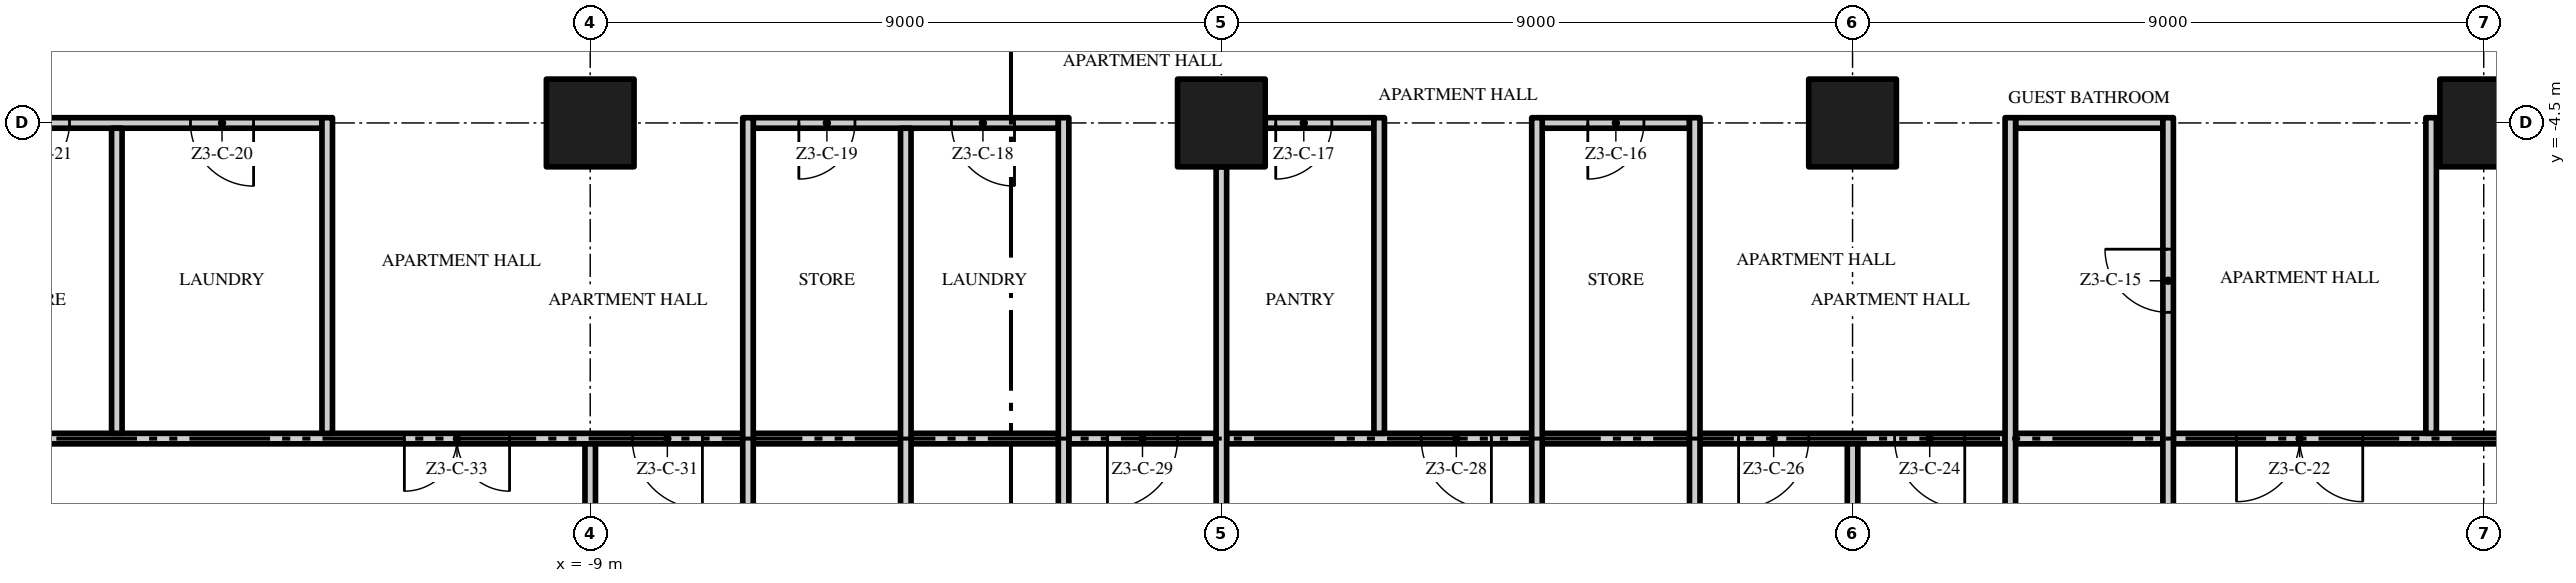
"""IFC4 building model, lengths in metres.
Left out: names, types, materials, properties, quantities, classifications, styles, units other than length and angle.
Written with IfcOpenShell. Run it as: python <this file> out.ifc"""

import sys

from ifc_helpers import new_model, si_unit, direction, frame, frame_2d, origin, origin_2d, place, context, subcontext, project, spatial, rectangle, extrude, element, fill, save


model = new_model("IFC4")
c1 = context("Model", 3, precision=1e-05, world=origin(), true_north=direction((0.0, 1.0)))
c2 = subcontext(c1, "Body", "Model", "MODEL_VIEW")
j1 = project(units=[si_unit("LENGTHUNIT", "METRE"), si_unit("PLANEANGLEUNIT", "RADIAN")], contexts=[c1])
p1 = place(None, origin())
s1 = spatial("IfcSite", under=j1, at=p1, CompositionType="ELEMENT")
p2 = place(p1, origin())
s2 = spatial("IfcBuilding", under=s1, at=p2, CompositionType="ELEMENT")
p3 = place(p2, frame((0.0, 0.0, 155.4)))
s3 = spatial("IfcBuildingStorey", under=s2, at=p3, CompositionType="ELEMENT", Elevation=155.4)
for number, where, z_axis, x_axis in (
    (1, (-9.0, -4.5, 0.0), (0.0, 0.0, 1.0), (1.0, 0.0, 0.0)),
    (2, (0.0, -4.5, 0.0), (0.0, 0.0, 1.0), (1.0, 0.0, 0.0)),
    (3, (18.0, -4.5, 0.0), (0.0, 0.0, 1.0), (1.0, 0.0, 0.0)),
    (4, (9.0, -4.5, 0.0), (0.0, 0.0, 1.0), (1.0, 0.0, 0.0)),
):
    element("IfcColumn", number, at=place(p3, frame(where, z_axis=z_axis, x_axis=x_axis)), inside=s3, PredefinedType="COLUMN", context=c2, shape_type="SweptSolid", body=[
        extrude(rectangle(XDim=1.25, YDim=1.25, at=origin_2d()), origin(), (0.0, 0.0, 1.0), 3.5),
    ])
p4 = place(p3, frame((-6.825, -9.0, 0.0), z_axis=(0.0, 0.0, 1.0), x_axis=(-1.0, 0.0, 0.0)))
e5 = element("IfcWall", 5, at=p4, inside=s3, PredefinedType="PARTITIONING", context=c2, shape_type="SweptSolid", body=[
    extrude(rectangle(XDim=11.1, YDim=0.15, at=frame_2d((5.55, 0.0))), origin(), (0.0, 0.0, 1.0), 3.5),
])
p5 = place(p4, frame((0.575, 0.0, 0.0)))
e6 = element("IfcOpeningElement", 6, at=p5, cuts=e5, PredefinedType="OPENING", context=c2, shape_type="SweptSolid", body=[
    extrude(rectangle(XDim=1.0, YDim=2.4, at=frame_2d((0.5, 1.2))), frame((0.0, 0.085, 0.0), z_axis=(0.0, -1.0, 0.0), x_axis=(1.0, 0.0, 0.0)), (0.0, 0.0, 1.0), 0.17),
])
p6 = place(p4, frame((3.325, 0.0, 0.0)))
e7 = element("IfcOpeningElement", 7, at=p6, cuts=e5, PredefinedType="OPENING", context=c2, shape_type="SweptSolid", body=[
    extrude(rectangle(XDim=1.5, YDim=2.4, at=frame_2d((0.75, 1.2))), frame((0.0, 0.085, 0.0), z_axis=(0.0, -1.0, 0.0), x_axis=(1.0, 0.0, 0.0)), (0.0, 0.0, 1.0), 0.17),
])
for number, where, z_axis, x_axis in (
    (8, (-6.675, -9.0, 0.0), (0.0, 0.0, 1.0), (1.0, 0.0, 0.0)),
    (9, (-4.425, -9.0, 0.0), (0.0, 0.0, 1.0), (1.0, 0.0, 0.0)),
):
    element("IfcWall", number, at=place(p3, frame(where, z_axis=z_axis, x_axis=x_axis)), inside=s3, PredefinedType="PARTITIONING", context=c2, shape_type="SweptSolid", body=[
        extrude(rectangle(XDim=2.1, YDim=0.15, at=frame_2d((1.05, 0.0))), origin(), (0.0, 0.0, 1.0), 3.5),
    ])
p7 = place(p3, frame((-0.075, -9.0, 0.0), z_axis=(0.0, 0.0, 1.0), x_axis=(-1.0, 0.0, 0.0)))
e10 = element("IfcWall", 10, at=p7, inside=s3, PredefinedType="PARTITIONING", context=c2, shape_type="SweptSolid", body=[
    extrude(rectangle(XDim=2.1, YDim=0.15, at=frame_2d((1.05, 0.0))), origin(), (0.0, 0.0, 1.0), 3.5),
])
p8 = place(p7, frame((0.55, 0.0, 0.0)))
e11 = element("IfcOpeningElement", 11, at=p8, cuts=e10, PredefinedType="OPENING", context=c2, shape_type="SweptSolid", body=[
    extrude(rectangle(XDim=1.0, YDim=2.4, at=frame_2d((0.5, 1.2))), frame((0.0, 0.085, 0.0), z_axis=(0.0, -1.0, 0.0), x_axis=(1.0, 0.0, 0.0)), (0.0, 0.0, 1.0), 0.17),
])
p9 = place(p3, frame((4.425, -9.0, 0.0), z_axis=(0.0, 0.0, 1.0), x_axis=(-1.0, 0.0, 0.0)))
e12 = element("IfcWall", 12, at=p9, inside=s3, PredefinedType="PARTITIONING", context=c2, shape_type="SweptSolid", body=[
    extrude(rectangle(XDim=4.35, YDim=0.15, at=frame_2d((2.175, 0.0))), origin(), (0.0, 0.0, 1.0), 3.5),
])
p10 = place(p9, frame((0.575, 0.0, 0.0)))
e13 = element("IfcOpeningElement", 13, at=p10, cuts=e12, PredefinedType="OPENING", context=c2, shape_type="SweptSolid", body=[
    extrude(rectangle(XDim=1.0, YDim=2.4, at=frame_2d((0.5, 1.2))), frame((0.0, 0.085, 0.0), z_axis=(0.0, -1.0, 0.0), x_axis=(1.0, 0.0, 0.0)), (0.0, 0.0, 1.0), 0.17),
])
p11 = place(p3, frame((4.575, -9.0, 0.0), z_axis=(0.0, 0.0, 1.0), x_axis=(1.0, 0.0, 0.0)))
e14 = element("IfcWall", 14, at=p11, inside=s3, PredefinedType="PARTITIONING", context=c2, shape_type="SweptSolid", body=[
    extrude(rectangle(XDim=2.1, YDim=0.15, at=frame_2d((1.05, 0.0))), origin(), (0.0, 0.0, 1.0), 3.5),
])
p12 = place(p3, frame((11.175, -9.0, 0.0), z_axis=(0.0, 0.0, 1.0), x_axis=(-1.0, 0.0, 0.0)))
e15 = element("IfcWall", 15, at=p12, inside=s3, PredefinedType="PARTITIONING", context=c2, shape_type="SweptSolid", body=[
    extrude(rectangle(XDim=4.35, YDim=0.15, at=frame_2d((2.175, 0.0))), origin(), (0.0, 0.0, 1.0), 3.5),
])
p13 = place(p12, frame((0.575, 0.0, 0.0)))
e16 = element("IfcOpeningElement", 16, at=p13, cuts=e15, PredefinedType="OPENING", context=c2, shape_type="SweptSolid", body=[
    extrude(rectangle(XDim=1.0, YDim=2.4, at=frame_2d((0.5, 1.2))), frame((0.0, 0.085, 0.0), z_axis=(0.0, -1.0, 0.0), x_axis=(1.0, 0.0, 0.0)), (0.0, 0.0, 1.0), 0.17),
])
p14 = place(p12, frame((2.8, 0.0, 0.0)))
e17 = element("IfcOpeningElement", 17, at=p14, cuts=e15, PredefinedType="OPENING", context=c2, shape_type="SweptSolid", body=[
    extrude(rectangle(XDim=1.0, YDim=2.4, at=frame_2d((0.5, 1.2))), frame((0.0, 0.085, 0.0), z_axis=(0.0, -1.0, 0.0), x_axis=(1.0, 0.0, 0.0)), (0.0, 0.0, 1.0), 0.17),
])
p15 = place(p3, frame((11.325, -9.0, 0.0), z_axis=(0.0, 0.0, 1.0), x_axis=(1.0, 0.0, 0.0)))
e18 = element("IfcWall", 18, at=p15, inside=s3, PredefinedType="PARTITIONING", context=c2, shape_type="SweptSolid", body=[
    extrude(rectangle(XDim=2.1, YDim=0.15, at=frame_2d((1.05, 0.0))), origin(), (0.0, 0.0, 1.0), 3.5),
])
p16 = place(p3, frame((22.2, -9.0, 0.0), z_axis=(0.0, 0.0, 1.0), x_axis=(-1.0, 0.0, 0.0)))
e19 = element("IfcWall", 19, at=p16, inside=s3, PredefinedType="PARTITIONING", context=c2, shape_type="SweptSolid", body=[
    extrude(rectangle(XDim=8.625, YDim=0.15, at=frame_2d((4.312, 0.0))), origin(), (0.0, 0.0, 1.0), 3.5),
])
p17 = place(p16, frame((5.925, 0.0, 0.0)))
e20 = element("IfcOpeningElement", 20, at=p17, cuts=e19, PredefinedType="OPENING", context=c2, shape_type="SweptSolid", body=[
    extrude(rectangle(XDim=1.8, YDim=2.4, at=frame_2d((0.9, 1.2))), frame((0.0, 0.085, 0.0), z_axis=(0.0, -1.0, 0.0), x_axis=(1.0, 0.0, 0.0)), (0.0, 0.0, 1.0), 0.17),
])
p18 = place(p3, frame((-12.825, -4.5, 0.0), z_axis=(0.0, 0.0, 1.0), x_axis=(-1.0, 0.0, 0.0)))
e21 = element("IfcWall", 21, at=p18, inside=s3, PredefinedType="PARTITIONING", context=c2, shape_type="SweptSolid", body=[
    extrude(rectangle(XDim=4.55, YDim=0.15, at=frame_2d((2.275, 0.0))), origin(), (0.0, 0.0, 1.0), 3.5),
])
p19 = place(p18, frame((0.975, 0.0, 0.0)))
e22 = element("IfcOpeningElement", 22, at=p19, cuts=e21, PredefinedType="OPENING", context=c2, shape_type="SweptSolid", body=[
    extrude(rectangle(XDim=0.9, YDim=2.1, at=frame_2d((0.45, 1.05))), frame((0.0, 0.085, 0.0), z_axis=(0.0, -1.0, 0.0), x_axis=(1.0, 0.0, 0.0)), (0.0, 0.0, 1.0), 0.17),
])
p20 = place(p18, frame((3.6, 0.0, 0.0)))
e23 = element("IfcOpeningElement", 23, at=p20, cuts=e21, PredefinedType="OPENING", context=c2, shape_type="SweptSolid", body=[
    extrude(rectangle(XDim=0.8, YDim=2.0, at=frame_2d((0.4, 1.0))), frame((0.0, 0.085, 0.0), z_axis=(0.0, -1.0, 0.0), x_axis=(1.0, 0.0, 0.0)), (0.0, 0.0, 1.0), 0.17),
])
p21 = place(p3, frame((-2.325, -4.5, 0.0), z_axis=(0.0, 0.0, 1.0), x_axis=(-1.0, 0.0, 0.0)))
e24 = element("IfcWall", 24, at=p21, inside=s3, PredefinedType="PARTITIONING", context=c2, shape_type="SweptSolid", body=[
    extrude(rectangle(XDim=4.35, YDim=0.15, at=frame_2d((2.175, 0.0))), origin(), (0.0, 0.0, 1.0), 3.5),
])
p22 = place(p21, frame((0.625, 0.0, 0.0)))
e25 = element("IfcOpeningElement", 25, at=p22, cuts=e24, PredefinedType="OPENING", context=c2, shape_type="SweptSolid", body=[
    extrude(rectangle(XDim=0.9, YDim=2.1, at=frame_2d((0.45, 1.05))), frame((0.0, 0.085, 0.0), z_axis=(0.0, -1.0, 0.0), x_axis=(1.0, 0.0, 0.0)), (0.0, 0.0, 1.0), 0.17),
])
p23 = place(p21, frame((2.9, 0.0, 0.0)))
e26 = element("IfcOpeningElement", 26, at=p23, cuts=e24, PredefinedType="OPENING", context=c2, shape_type="SweptSolid", body=[
    extrude(rectangle(XDim=0.8, YDim=2.0, at=frame_2d((0.4, 1.0))), frame((0.0, 0.085, 0.0), z_axis=(0.0, -1.0, 0.0), x_axis=(1.0, 0.0, 0.0)), (0.0, 0.0, 1.0), 0.17),
])
p24 = place(p3, frame((2.175, -4.5, 0.0), z_axis=(0.0, 0.0, 1.0), x_axis=(-1.0, 0.0, 0.0)))
e27 = element("IfcWall", 27, at=p24, inside=s3, PredefinedType="PARTITIONING", context=c2, shape_type="SweptSolid", body=[
    extrude(rectangle(XDim=1.55, YDim=0.15, at=frame_2d((0.775, 0.0))), origin(), (0.0, 0.0, 1.0), 3.5),
])
p25 = place(p24, frame((0.6, 0.0, 0.0)))
e28 = element("IfcOpeningElement", 28, at=p25, cuts=e27, PredefinedType="OPENING", context=c2, shape_type="SweptSolid", body=[
    extrude(rectangle(XDim=0.8, YDim=2.0, at=frame_2d((0.4, 1.0))), frame((0.0, 0.085, 0.0), z_axis=(0.0, -1.0, 0.0), x_axis=(1.0, 0.0, 0.0)), (0.0, 0.0, 1.0), 0.17),
])
p26 = place(p3, frame((6.675, -4.5, 0.0), z_axis=(0.0, 0.0, 1.0), x_axis=(-1.0, 0.0, 0.0)))
e29 = element("IfcWall", 29, at=p26, inside=s3, PredefinedType="PARTITIONING", context=c2, shape_type="SweptSolid", body=[
    extrude(rectangle(XDim=2.1, YDim=0.15, at=frame_2d((1.05, 0.0))), origin(), (0.0, 0.0, 1.0), 3.5),
])
p27 = place(p26, frame((0.65, 0.0, 0.0)))
e30 = element("IfcOpeningElement", 30, at=p27, cuts=e29, PredefinedType="OPENING", context=c2, shape_type="SweptSolid", body=[
    extrude(rectangle(XDim=0.8, YDim=2.0, at=frame_2d((0.4, 1.0))), frame((0.0, 0.085, 0.0), z_axis=(0.0, -1.0, 0.0), x_axis=(1.0, 0.0, 0.0)), (0.0, 0.0, 1.0), 0.17),
])
p28 = place(p3, frame((11.325, -4.5, 0.0), z_axis=(0.0, 0.0, 1.0), x_axis=(1.0, 0.0, 0.0)))
e31 = element("IfcWall", 31, at=p28, inside=s3, PredefinedType="PARTITIONING", context=c2, shape_type="SweptSolid", body=[
    extrude(rectangle(XDim=2.1, YDim=0.15, at=frame_2d((1.05, 0.0))), origin(), (0.0, 0.0, 1.0), 3.5),
])
p29 = place(p3, frame((-15.75, -8.925, 0.0), z_axis=(0.0, 0.0, 1.0), x_axis=(0.0, 1.0, 0.0)))
e32 = element("IfcWall", 32, at=p29, inside=s3, PredefinedType="PARTITIONING", context=c2, shape_type="SweptSolid", body=[
    extrude(rectangle(XDim=4.35, YDim=0.15, at=frame_2d((2.175, 0.0))), origin(), (0.0, 0.0, 1.0), 3.5),
])
p30 = place(p3, frame((-12.75, -8.925, 0.0), z_axis=(0.0, 0.0, 1.0), x_axis=(0.0, 1.0, 0.0)))
e33 = element("IfcWall", 33, at=p30, inside=s3, PredefinedType="PARTITIONING", context=c2, shape_type="SweptSolid", body=[
    extrude(rectangle(XDim=4.5, YDim=0.15, at=frame_2d((2.25, 0.0))), origin(), (0.0, 0.0, 1.0), 3.5),
])
p31 = place(p3, frame((-9.0, -12.875, 0.0), z_axis=(0.0, 0.0, 1.0), x_axis=(0.0, 1.0, 0.0)))
e34 = element("IfcWall", 34, at=p31, inside=s3, PredefinedType="PARTITIONING", context=c2, shape_type="SweptSolid", body=[
    extrude(rectangle(XDim=3.8, YDim=0.15, at=frame_2d((1.9, 0.0))), origin(), (0.0, 0.0, 1.0), 3.5),
])
p32 = place(p3, frame((-6.75, -12.075, 0.0), z_axis=(0.0, 0.0, 1.0), x_axis=(0.0, 1.0, 0.0)))
e35 = element("IfcWall", 35, at=p32, inside=s3, PredefinedType="PARTITIONING", context=c2, shape_type="SweptSolid", body=[
    extrude(rectangle(XDim=7.65, YDim=0.15, at=frame_2d((3.825, 0.0))), origin(), (0.0, 0.0, 1.0), 3.5),
])
p33 = place(p3, frame((-4.5, -17.7, 0.0), z_axis=(0.0, 0.0, 1.0), x_axis=(0.0, 1.0, 0.0)))
e36 = element("IfcWall", 36, at=p33, inside=s3, PredefinedType="PARTITIONING", context=c2, shape_type="SweptSolid", body=[
    extrude(rectangle(XDim=13.125, YDim=0.15, at=frame_2d((6.562, 0.0))), origin(), (0.0, 0.0, 1.0), 3.5),
])
p34 = place(p3, frame((-2.25, -12.075, 0.0), z_axis=(0.0, 0.0, 1.0), x_axis=(0.0, 1.0, 0.0)))
e37 = element("IfcWall", 37, at=p34, inside=s3, PredefinedType="PARTITIONING", context=c2, shape_type="SweptSolid", body=[
    extrude(rectangle(XDim=7.65, YDim=0.15, at=frame_2d((3.825, 0.0))), origin(), (0.0, 0.0, 1.0), 3.5),
])
p35 = place(p3, frame((0.0, -12.875, 0.0), z_axis=(0.0, 0.0, 1.0), x_axis=(0.0, 1.0, 0.0)))
e38 = element("IfcWall", 38, at=p35, inside=s3, PredefinedType="PARTITIONING", context=c2, shape_type="SweptSolid", body=[
    extrude(rectangle(XDim=7.75, YDim=0.15, at=frame_2d((3.875, 0.0))), origin(), (0.0, 0.0, 1.0), 3.5),
])
p36 = place(p3, frame((2.25, -8.925, 0.0), z_axis=(0.0, 0.0, 1.0), x_axis=(0.0, 1.0, 0.0)))
e39 = element("IfcWall", 39, at=p36, inside=s3, PredefinedType="PARTITIONING", context=c2, shape_type="SweptSolid", body=[
    extrude(rectangle(XDim=4.5, YDim=0.15, at=frame_2d((2.25, 0.0))), origin(), (0.0, 0.0, 1.0), 3.5),
])
p37 = place(p3, frame((4.5, -17.7, 0.0), z_axis=(0.0, 0.0, 1.0), x_axis=(0.0, 1.0, 0.0)))
e40 = element("IfcWall", 40, at=p37, inside=s3, PredefinedType="PARTITIONING", context=c2, shape_type="SweptSolid", body=[
    extrude(rectangle(XDim=13.275, YDim=0.15, at=frame_2d((6.638, 0.0))), origin(), (0.0, 0.0, 1.0), 3.5),
])
p38 = place(p3, frame((6.75, -12.075, 0.0), z_axis=(0.0, 0.0, 1.0), x_axis=(0.0, 1.0, 0.0)))
e41 = element("IfcWall", 41, at=p38, inside=s3, PredefinedType="PARTITIONING", context=c2, shape_type="SweptSolid", body=[
    extrude(rectangle(XDim=7.65, YDim=0.15, at=frame_2d((3.825, 0.0))), origin(), (0.0, 0.0, 1.0), 3.5),
])
p39 = place(p3, frame((9.0, -12.875, 0.0), z_axis=(0.0, 0.0, 1.0), x_axis=(0.0, 1.0, 0.0)))
e42 = element("IfcWall", 42, at=p39, inside=s3, PredefinedType="PARTITIONING", context=c2, shape_type="SweptSolid", body=[
    extrude(rectangle(XDim=3.8, YDim=0.15, at=frame_2d((1.9, 0.0))), origin(), (0.0, 0.0, 1.0), 3.5),
])
p40 = place(p3, frame((11.25, -12.075, 0.0), z_axis=(0.0, 0.0, 1.0), x_axis=(0.0, 1.0, 0.0)))
e43 = element("IfcWall", 43, at=p40, inside=s3, PredefinedType="PARTITIONING", context=c2, shape_type="SweptSolid", body=[
    extrude(rectangle(XDim=7.65, YDim=0.15, at=frame_2d((3.825, 0.0))), origin(), (0.0, 0.0, 1.0), 3.5),
])
p41 = place(p3, frame((13.5, -17.7, 0.0), z_axis=(0.0, 0.0, 1.0), x_axis=(0.0, 1.0, 0.0)))
e44 = element("IfcWall", 44, at=p41, inside=s3, PredefinedType="PARTITIONING", context=c2, shape_type="SweptSolid", body=[
    extrude(rectangle(XDim=13.275, YDim=0.15, at=frame_2d((6.638, 0.0))), origin(), (0.0, 0.0, 1.0), 3.5),
])
p42 = place(p41, frame((10.5, 0.0, 0.0)))
e45 = element("IfcOpeningElement", 45, at=p42, cuts=e44, PredefinedType="OPENING", context=c2, shape_type="SweptSolid", body=[
    extrude(rectangle(XDim=0.9, YDim=2.1, at=frame_2d((0.45, 1.05))), frame((0.0, 0.085, 0.0), z_axis=(0.0, -1.0, 0.0), x_axis=(1.0, 0.0, 0.0)), (0.0, 0.0, 1.0), 0.17),
])
p43 = place(p3, frame((17.25, -8.925, 0.0), z_axis=(0.0, 0.0, 1.0), x_axis=(0.0, 1.0, 0.0)))
e46 = element("IfcWall", 46, at=p43, inside=s3, PredefinedType="PARTITIONING", context=c2, shape_type="SweptSolid", body=[
    extrude(rectangle(XDim=4.5, YDim=0.15, at=frame_2d((2.25, 0.0))), origin(), (0.0, 0.0, 1.0), 3.5),
])
p44 = place(p42, origin())
e47 = element("IfcDoor", 47, at=p44, inside=s3, OperationType="SINGLE_SWING_RIGHT", PredefinedType="DOOR", context=c2, shape_type="SweptSolid", body=[
    extrude(rectangle(XDim=0.9, YDim=2.1, at=frame_2d((0.45, 1.05))), frame((0.0, 0.025, 0.0), z_axis=(0.0, -1.0, 0.0), x_axis=(1.0, 0.0, 0.0)), (0.0, 0.0, 1.0), 0.05),
])
fill(e45, e47)
p45 = place(p27, origin())
e48 = element("IfcDoor", 48, at=p45, inside=s3, OperationType="SINGLE_SWING_RIGHT", PredefinedType="DOOR", context=c2, shape_type="SweptSolid", body=[
    extrude(rectangle(XDim=0.8, YDim=2.0, at=frame_2d((0.4, 1.0))), frame((0.0, 0.025, 0.0), z_axis=(0.0, -1.0, 0.0), x_axis=(1.0, 0.0, 0.0)), (0.0, 0.0, 1.0), 0.05),
])
fill(e30, e48)
p46 = place(p25, origin())
e49 = element("IfcDoor", 49, at=p46, inside=s3, OperationType="SINGLE_SWING_RIGHT", PredefinedType="DOOR", context=c2, shape_type="SweptSolid", body=[
    extrude(rectangle(XDim=0.8, YDim=2.0, at=frame_2d((0.4, 1.0))), frame((0.0, 0.025, 0.0), z_axis=(0.0, -1.0, 0.0), x_axis=(1.0, 0.0, 0.0)), (0.0, 0.0, 1.0), 0.05),
])
fill(e28, e49)
p47 = place(p22, origin())
e50 = element("IfcDoor", 50, at=p47, inside=s3, OperationType="SINGLE_SWING_LEFT", PredefinedType="DOOR", context=c2, shape_type="SweptSolid", body=[
    extrude(rectangle(XDim=0.9, YDim=2.1, at=frame_2d((0.45, 1.05))), frame((0.0, 0.025, 0.0), z_axis=(0.0, -1.0, 0.0), x_axis=(1.0, 0.0, 0.0)), (0.0, 0.0, 1.0), 0.05),
])
fill(e25, e50)
p48 = place(p23, origin())
e51 = element("IfcDoor", 51, at=p48, inside=s3, OperationType="SINGLE_SWING_RIGHT", PredefinedType="DOOR", context=c2, shape_type="SweptSolid", body=[
    extrude(rectangle(XDim=0.8, YDim=2.0, at=frame_2d((0.4, 1.0))), frame((0.0, 0.025, 0.0), z_axis=(0.0, -1.0, 0.0), x_axis=(1.0, 0.0, 0.0)), (0.0, 0.0, 1.0), 0.05),
])
fill(e26, e51)
p49 = place(p19, origin())
e52 = element("IfcDoor", 52, at=p49, inside=s3, OperationType="SINGLE_SWING_LEFT", PredefinedType="DOOR", context=c2, shape_type="SweptSolid", body=[
    extrude(rectangle(XDim=0.9, YDim=2.1, at=frame_2d((0.45, 1.05))), frame((0.0, 0.025, 0.0), z_axis=(0.0, -1.0, 0.0), x_axis=(1.0, 0.0, 0.0)), (0.0, 0.0, 1.0), 0.05),
])
fill(e22, e52)
p50 = place(p20, origin())
e53 = element("IfcDoor", 53, at=p50, inside=s3, OperationType="SINGLE_SWING_RIGHT", PredefinedType="DOOR", context=c2, shape_type="SweptSolid", body=[
    extrude(rectangle(XDim=0.8, YDim=2.0, at=frame_2d((0.4, 1.0))), frame((0.0, 0.025, 0.0), z_axis=(0.0, -1.0, 0.0), x_axis=(1.0, 0.0, 0.0)), (0.0, 0.0, 1.0), 0.05),
])
fill(e23, e53)
p51 = place(p17, origin())
e54 = element("IfcDoor", 54, at=p51, inside=s3, OperationType="DOUBLE_DOOR_SINGLE_SWING", PredefinedType="DOOR", context=c2, shape_type="SweptSolid", body=[
    extrude(rectangle(XDim=1.8, YDim=2.4, at=frame_2d((0.9, 1.2))), frame((0.0, 0.025, 0.0), z_axis=(0.0, -1.0, 0.0), x_axis=(1.0, 0.0, 0.0)), (0.0, 0.0, 1.0), 0.05),
])
fill(e20, e54)
p52 = place(p13, origin())
e55 = element("IfcDoor", 55, at=p52, inside=s3, OperationType="SINGLE_SWING_LEFT", PredefinedType="DOOR", context=c2, shape_type="SweptSolid", body=[
    extrude(rectangle(XDim=1.0, YDim=2.4, at=frame_2d((0.5, 1.2))), frame((0.0, 0.025, 0.0), z_axis=(0.0, -1.0, 0.0), x_axis=(1.0, 0.0, 0.0)), (0.0, 0.0, 1.0), 0.05),
])
fill(e16, e55)
p53 = place(p14, origin())
e56 = element("IfcDoor", 56, at=p53, inside=s3, OperationType="SINGLE_SWING_RIGHT", PredefinedType="DOOR", context=c2, shape_type="SweptSolid", body=[
    extrude(rectangle(XDim=1.0, YDim=2.4, at=frame_2d((0.5, 1.2))), frame((0.0, 0.025, 0.0), z_axis=(0.0, -1.0, 0.0), x_axis=(1.0, 0.0, 0.0)), (0.0, 0.0, 1.0), 0.05),
])
fill(e17, e56)
p54 = place(p10, origin())
e57 = element("IfcDoor", 57, at=p54, inside=s3, OperationType="SINGLE_SWING_LEFT", PredefinedType="DOOR", context=c2, shape_type="SweptSolid", body=[
    extrude(rectangle(XDim=1.0, YDim=2.4, at=frame_2d((0.5, 1.2))), frame((0.0, 0.025, 0.0), z_axis=(0.0, -1.0, 0.0), x_axis=(1.0, 0.0, 0.0)), (0.0, 0.0, 1.0), 0.05),
])
fill(e13, e57)
p55 = place(p8, origin())
e58 = element("IfcDoor", 58, at=p55, inside=s3, OperationType="SINGLE_SWING_RIGHT", PredefinedType="DOOR", context=c2, shape_type="SweptSolid", body=[
    extrude(rectangle(XDim=1.0, YDim=2.4, at=frame_2d((0.5, 1.2))), frame((0.0, 0.025, 0.0), z_axis=(0.0, -1.0, 0.0), x_axis=(1.0, 0.0, 0.0)), (0.0, 0.0, 1.0), 0.05),
])
fill(e11, e58)
p56 = place(p5, origin())
e59 = element("IfcDoor", 59, at=p56, inside=s3, OperationType="SINGLE_SWING_LEFT", PredefinedType="DOOR", context=c2, shape_type="SweptSolid", body=[
    extrude(rectangle(XDim=1.0, YDim=2.4, at=frame_2d((0.5, 1.2))), frame((0.0, 0.025, 0.0), z_axis=(0.0, -1.0, 0.0), x_axis=(1.0, 0.0, 0.0)), (0.0, 0.0, 1.0), 0.05),
])
fill(e6, e59)
p57 = place(p6, origin())
e60 = element("IfcDoor", 60, at=p57, inside=s3, OperationType="DOUBLE_DOOR_SINGLE_SWING", PredefinedType="DOOR", context=c2, shape_type="SweptSolid", body=[
    extrude(rectangle(XDim=1.5, YDim=2.4, at=frame_2d((0.75, 1.2))), frame((0.0, 0.025, 0.0), z_axis=(0.0, -1.0, 0.0), x_axis=(1.0, 0.0, 0.0)), (0.0, 0.0, 1.0), 0.05),
])
fill(e7, e60)
save(model, sys.argv[1])
